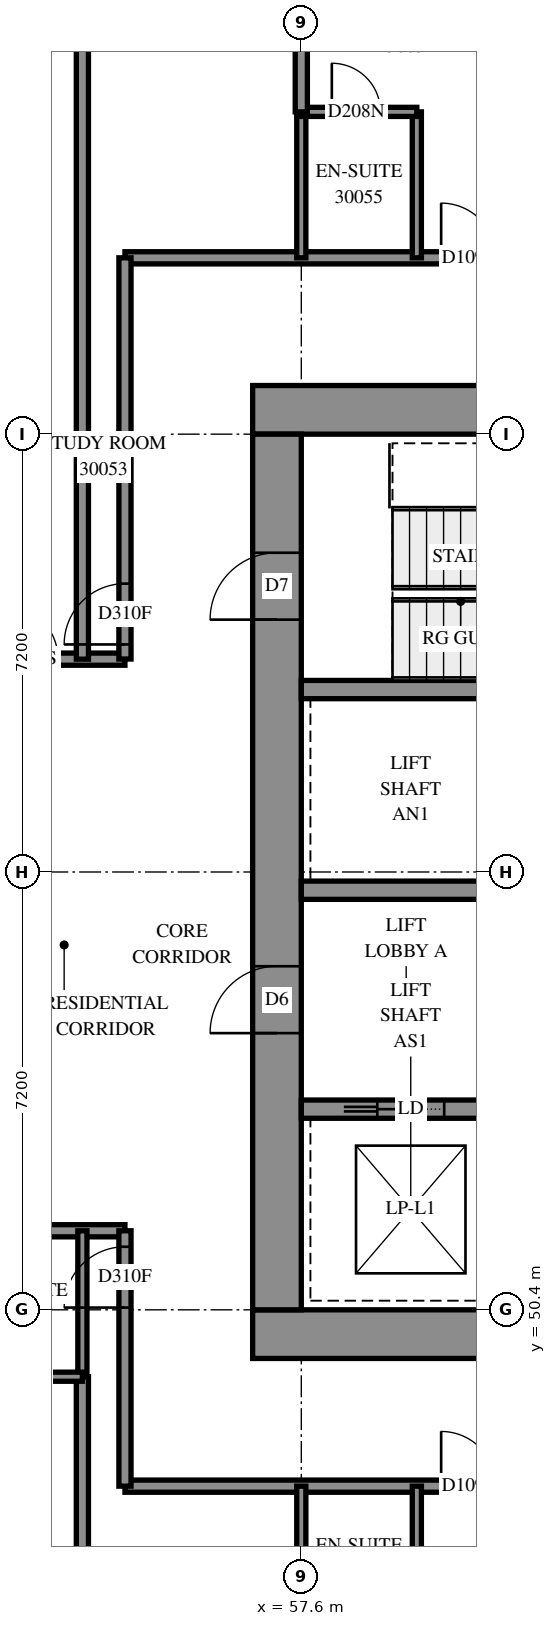
"""IFC4 building model, lengths in metres.
Left out: names, types, materials, properties, quantities, classifications, styles, units other than length and angle.
Written with IfcOpenShell. Run it as: python <this file> out.ifc"""

import sys

from ifc_helpers import new_model, si_unit, direction, frame, frame_2d, origin, place, context, subcontext, project, spatial, rectangle, extrude, element, fill, save


model = new_model("IFC4")
c1 = context("Model", 3, precision=1e-05, world=origin(), true_north=direction((0.0, 1.0)))
c2 = subcontext(c1, "Body", "Model", "MODEL_VIEW")
j1 = project(units=[si_unit("LENGTHUNIT", "METRE"), si_unit("PLANEANGLEUNIT", "RADIAN")], contexts=[c1])
p1 = place(None, origin())
s1 = spatial("IfcSite", under=j1, at=p1, CompositionType="ELEMENT")
p2 = place(p1, origin())
s2 = spatial("IfcBuilding", under=s1, at=p2, CompositionType="ELEMENT")
p3 = place(p2, frame((0.0, 0.0, 111.8)))
s3 = spatial("IfcBuildingStorey", under=s2, at=p3, CompositionType="ELEMENT", Elevation=111.8)
p4 = place(p3, frame((56.8, 50.0, -0.3), z_axis=(0.0, 0.0, 1.0), x_axis=(1.0, 0.0, 0.0)))
e1 = element("IfcWall", 1, at=p4, inside=s3, PredefinedType="SHEAR", context=c2, shape_type="SweptSolid", body=[
    extrude(rectangle(XDim=16.0, YDim=0.8, at=frame_2d((8.0, 0.0))), origin(), (0.0, 0.0, 1.0), 2.7),
])
p5 = place(p3, frame((56.8, 65.2, -0.3), z_axis=(0.0, 0.0, 1.0), x_axis=(1.0, 0.0, 0.0)))
e2 = element("IfcWall", 2, at=p5, inside=s3, PredefinedType="SHEAR", context=c2, shape_type="SweptSolid", body=[
    extrude(rectangle(XDim=16.0, YDim=0.8, at=frame_2d((8.0, 0.0))), origin(), (0.0, 0.0, 1.0), 2.7),
])
p6 = place(p5, frame((10.8, 0.0, 0.3)))
e3 = element("IfcOpeningElement", 3, at=p6, cuts=e2, PredefinedType="OPENING", context=c2, shape_type="SweptSolid", body=[
    extrude(rectangle(XDim=0.8, YDim=2.1, at=frame_2d((0.4, 1.05))), frame((0.0, 0.41, 0.0), z_axis=(0.0, -1.0, 0.0), x_axis=(1.0, 0.0, 0.0)), (0.0, 0.0, 1.0), 0.82),
])
p7 = place(p3, frame((57.2, 50.4, -0.3), z_axis=(0.0, 0.0, 1.0), x_axis=(0.0, 1.0, 0.0)))
e4 = element("IfcWall", 4, at=p7, inside=s3, PredefinedType="SHEAR", context=c2, shape_type="SweptSolid", body=[
    extrude(rectangle(XDim=14.4, YDim=0.8, at=frame_2d((7.2, 0.0))), origin(), (0.0, 0.0, 1.0), 2.7),
])
p8 = place(p7, frame((4.55, 0.0, 0.3)))
e5 = element("IfcOpeningElement", 5, at=p8, cuts=e4, PredefinedType="OPENING", context=c2, shape_type="SweptSolid", body=[
    extrude(rectangle(XDim=1.1, YDim=2.1, at=frame_2d((0.55, 1.05))), frame((0.0, 0.41, 0.0), z_axis=(0.0, -1.0, 0.0), x_axis=(1.0, 0.0, 0.0)), (0.0, 0.0, 1.0), 0.82),
])
p9 = place(p7, frame((11.35, 0.0, 0.3)))
e6 = element("IfcOpeningElement", 6, at=p9, cuts=e4, PredefinedType="OPENING", context=c2, shape_type="SweptSolid", body=[
    extrude(rectangle(XDim=1.1, YDim=2.1, at=frame_2d((0.55, 1.05))), frame((0.0, 0.41, 0.0), z_axis=(0.0, -1.0, 0.0), x_axis=(1.0, 0.0, 0.0)), (0.0, 0.0, 1.0), 0.82),
])
p10 = place(p3, frame((57.6, 53.7, 0.0), z_axis=(0.0, 0.0, 1.0), x_axis=(1.0, 0.0, 0.0)))
e7 = element("IfcWall", 7, at=p10, inside=s3, PredefinedType="SOLIDWALL", context=c2, shape_type="SweptSolid", body=[
    extrude(rectangle(XDim=14.4, YDim=0.3, at=frame_2d((7.2, 0.0))), origin(), (0.0, 0.0, 1.0), 3.1),
])
p11 = place(p10, frame((1.25, 0.0, 0.0)))
e8 = element("IfcOpeningElement", 8, at=p11, cuts=e7, PredefinedType="OPENING", context=c2, shape_type="SweptSolid", body=[
    extrude(rectangle(XDim=1.1, YDim=2.1, at=frame_2d((0.55, 1.05))), frame((0.0, 0.16, 0.0), z_axis=(0.0, -1.0, 0.0), x_axis=(1.0, 0.0, 0.0)), (0.0, 0.0, 1.0), 0.32),
])
p12 = place(p10, frame((4.85, 0.0, 0.0)))
e9 = element("IfcOpeningElement", 9, at=p12, cuts=e7, PredefinedType="OPENING", context=c2, shape_type="SweptSolid", body=[
    extrude(rectangle(XDim=1.1, YDim=2.1, at=frame_2d((0.55, 1.05))), frame((0.0, 0.16, 0.0), z_axis=(0.0, -1.0, 0.0), x_axis=(1.0, 0.0, 0.0)), (0.0, 0.0, 1.0), 0.32),
])
p13 = place(p10, frame((8.45, 0.0, 0.0)))
e10 = element("IfcOpeningElement", 10, at=p13, cuts=e7, PredefinedType="OPENING", context=c2, shape_type="SweptSolid", body=[
    extrude(rectangle(XDim=1.1, YDim=2.1, at=frame_2d((0.55, 1.05))), frame((0.0, 0.16, 0.0), z_axis=(0.0, -1.0, 0.0), x_axis=(1.0, 0.0, 0.0)), (0.0, 0.0, 1.0), 0.32),
])
p14 = place(p10, frame((12.05, 0.0, 0.0)))
e11 = element("IfcOpeningElement", 11, at=p14, cuts=e7, PredefinedType="OPENING", context=c2, shape_type="SweptSolid", body=[
    extrude(rectangle(XDim=1.1, YDim=2.1, at=frame_2d((0.55, 1.05))), frame((0.0, 0.16, 0.0), z_axis=(0.0, -1.0, 0.0), x_axis=(1.0, 0.0, 0.0)), (0.0, 0.0, 1.0), 0.32),
])
p15 = place(p3, frame((57.6, 57.3, 0.0), z_axis=(0.0, 0.0, 1.0), x_axis=(1.0, 0.0, 0.0)))
e12 = element("IfcWall", 12, at=p15, inside=s3, PredefinedType="SOLIDWALL", context=c2, shape_type="SweptSolid", body=[
    extrude(rectangle(XDim=14.4, YDim=0.3, at=frame_2d((7.2, 0.0))), origin(), (0.0, 0.0, 1.0), 3.1),
])
p16 = place(p15, frame((12.05, 0.0, 0.0)))
e13 = element("IfcOpeningElement", 13, at=p16, cuts=e12, PredefinedType="OPENING", context=c2, shape_type="SweptSolid", body=[
    extrude(rectangle(XDim=1.1, YDim=2.1, at=frame_2d((0.55, 1.05))), frame((0.0, 0.16, 0.0), z_axis=(0.0, -1.0, 0.0), x_axis=(1.0, 0.0, 0.0)), (0.0, 0.0, 1.0), 0.32),
])
p17 = place(p3, frame((57.6, 60.6, 0.0), z_axis=(0.0, 0.0, 1.0), x_axis=(1.0, 0.0, 0.0)))
e14 = element("IfcWall", 14, at=p17, inside=s3, PredefinedType="SOLIDWALL", context=c2, shape_type="SweptSolid", body=[
    extrude(rectangle(XDim=7.2, YDim=0.3, at=frame_2d((3.6, 0.0))), origin(), (0.0, 0.0, 1.0), 3.1),
])
p18 = place(p3, frame((33.502, 61.1, 0.0), z_axis=(0.0, 0.0, 1.0), x_axis=(1.0, 0.0, 0.0)))
e15 = element("IfcWall", 15, at=p18, inside=s3, PredefinedType="PARTITIONING", context=c2, shape_type="SweptSolid", body=[
    extrude(rectangle(XDim=21.198, YDim=0.2, at=frame_2d((10.599, 0.0))), origin(), (0.0, 0.0, 1.0), 3.1),
])
p19 = place(p18, frame((4.798, 0.0, 0.0)))
e16 = element("IfcOpeningElement", 16, at=p19, cuts=e15, PredefinedType="OPENING", context=c2, shape_type="SweptSolid", body=[
    extrude(rectangle(XDim=0.9, YDim=2.1, at=frame_2d((0.45, 1.05))), frame((0.0, 0.11, 0.0), z_axis=(0.0, -1.0, 0.0), x_axis=(1.0, 0.0, 0.0)), (0.0, 0.0, 1.0), 0.22),
])
p20 = place(p18, frame((6.498, 0.0, 0.0)))
e17 = element("IfcOpeningElement", 17, at=p20, cuts=e15, PredefinedType="OPENING", context=c2, shape_type="SweptSolid", body=[
    extrude(rectangle(XDim=0.9, YDim=2.1, at=frame_2d((0.45, 1.05))), frame((0.0, 0.11, 0.0), z_axis=(0.0, -1.0, 0.0), x_axis=(1.0, 0.0, 0.0)), (0.0, 0.0, 1.0), 0.22),
])
p21 = place(p18, frame((11.998, 0.0, 0.0)))
e18 = element("IfcOpeningElement", 18, at=p21, cuts=e15, PredefinedType="OPENING", context=c2, shape_type="SweptSolid", body=[
    extrude(rectangle(XDim=0.9, YDim=2.1, at=frame_2d((0.45, 1.05))), frame((0.0, 0.11, 0.0), z_axis=(0.0, -1.0, 0.0), x_axis=(1.0, 0.0, 0.0)), (0.0, 0.0, 1.0), 0.22),
])
p22 = place(p18, frame((13.698, 0.0, 0.0)))
e19 = element("IfcOpeningElement", 19, at=p22, cuts=e15, PredefinedType="OPENING", context=c2, shape_type="SweptSolid", body=[
    extrude(rectangle(XDim=0.9, YDim=2.1, at=frame_2d((0.45, 1.05))), frame((0.0, 0.11, 0.0), z_axis=(0.0, -1.0, 0.0), x_axis=(1.0, 0.0, 0.0)), (0.0, 0.0, 1.0), 0.22),
])
p23 = place(p18, frame((19.198, 0.0, 0.0)))
e20 = element("IfcOpeningElement", 20, at=p23, cuts=e15, PredefinedType="OPENING", context=c2, shape_type="SweptSolid", body=[
    extrude(rectangle(XDim=0.9, YDim=2.1, at=frame_2d((0.45, 1.05))), frame((0.0, 0.11, 0.0), z_axis=(0.0, -1.0, 0.0), x_axis=(1.0, 0.0, 0.0)), (0.0, 0.0, 1.0), 0.22),
])
p24 = place(p3, frame((54.7, 67.7, 0.0), z_axis=(0.0, 0.0, 1.0), x_axis=(1.0, 0.0, 0.0)))
e21 = element("IfcWall", 21, at=p24, inside=s3, PredefinedType="PARTITIONING", context=c2, shape_type="SweptSolid", body=[
    extrude(rectangle(XDim=20.2, YDim=0.2, at=frame_2d((10.1, 0.0))), origin(), (0.0, 0.0, 1.0), 3.1),
])
p25 = place(p24, frame((5.2, 0.0, 0.0)))
e22 = element("IfcOpeningElement", 22, at=p25, cuts=e21, PredefinedType="OPENING", context=c2, shape_type="SweptSolid", body=[
    extrude(rectangle(XDim=0.9, YDim=2.1, at=frame_2d((0.45, 1.05))), frame((0.0, 0.11, 0.0), z_axis=(0.0, -1.0, 0.0), x_axis=(1.0, 0.0, 0.0)), (0.0, 0.0, 1.0), 0.22),
])
p26 = place(p24, frame((8.838, 0.0, 0.0)))
e23 = element("IfcOpeningElement", 23, at=p26, cuts=e21, PredefinedType="OPENING", context=c2, shape_type="SweptSolid", body=[
    extrude(rectangle(XDim=1.0, YDim=2.1, at=frame_2d((0.5, 1.05))), frame((0.0, 0.11, 0.0), z_axis=(0.0, -1.0, 0.0), x_axis=(1.0, 0.0, 0.0)), (0.0, 0.0, 1.0), 0.22),
])
p27 = place(p24, frame((14.1, 0.0, 0.0)))
e24 = element("IfcOpeningElement", 24, at=p27, cuts=e21, PredefinedType="OPENING", context=c2, shape_type="SweptSolid", body=[
    extrude(rectangle(XDim=0.9, YDim=2.1, at=frame_2d((0.45, 1.05))), frame((0.0, 0.11, 0.0), z_axis=(0.0, -1.0, 0.0), x_axis=(1.0, 0.0, 0.0)), (0.0, 0.0, 1.0), 0.22),
])
p28 = place(p3, frame((54.7, 47.5, 0.0), z_axis=(0.0, 0.0, 1.0), x_axis=(1.0, 0.0, 0.0)))
e25 = element("IfcWall", 25, at=p28, inside=s3, PredefinedType="PARTITIONING", context=c2, shape_type="SweptSolid", body=[
    extrude(rectangle(XDim=19.442, YDim=0.2, at=frame_2d((9.721, 0.0))), origin(), (0.0, 0.0, 1.0), 3.1),
])
p29 = place(p28, frame((5.2, 0.0, 0.0)))
e26 = element("IfcOpeningElement", 26, at=p29, cuts=e25, PredefinedType="OPENING", context=c2, shape_type="SweptSolid", body=[
    extrude(rectangle(XDim=0.9, YDim=2.1, at=frame_2d((0.45, 1.05))), frame((0.0, 0.11, 0.0), z_axis=(0.0, -1.0, 0.0), x_axis=(1.0, 0.0, 0.0)), (0.0, 0.0, 1.0), 0.22),
])
p30 = place(p28, frame((8.757, 0.0, 0.0)))
e27 = element("IfcOpeningElement", 27, at=p30, cuts=e25, PredefinedType="OPENING", context=c2, shape_type="SweptSolid", body=[
    extrude(rectangle(XDim=0.9, YDim=2.1, at=frame_2d((0.45, 1.05))), frame((0.0, 0.11, 0.0), z_axis=(0.0, -1.0, 0.0), x_axis=(1.0, 0.0, 0.0)), (0.0, 0.0, 1.0), 0.22),
])
p31 = place(p28, frame((14.05, 0.0, 0.0)))
e28 = element("IfcOpeningElement", 28, at=p31, cuts=e25, PredefinedType="OPENING", context=c2, shape_type="SweptSolid", body=[
    extrude(rectangle(XDim=0.9, YDim=2.1, at=frame_2d((0.45, 1.05))), frame((0.0, 0.11, 0.0), z_axis=(0.0, -1.0, 0.0), x_axis=(1.0, 0.0, 0.0)), (0.0, 0.0, 1.0), 0.22),
])
p32 = place(p3, frame((54.0, 61.1, 0.0), z_axis=(0.0, 0.0, 1.0), x_axis=(0.0, 1.0, 0.0)))
e29 = element("IfcWall", 29, at=p32, inside=s3, PredefinedType="PARTITIONING", context=c2, shape_type="SweptSolid", body=[
    extrude(rectangle(XDim=11.617, YDim=0.2, at=frame_2d((5.808, 0.0))), origin(), (0.0, 0.0, 1.0), 3.1),
])
p33 = place(p3, frame((54.0, 42.324, 0.0), z_axis=(0.0, 0.0, 1.0), x_axis=(0.0, 1.0, 0.0)))
e30 = element("IfcWall", 30, at=p33, inside=s3, PredefinedType="PARTITIONING", context=c2, shape_type="SweptSolid", body=[
    extrude(rectangle(XDim=6.976, YDim=0.2, at=frame_2d((3.488, 0.0))), origin(), (0.0, 0.0, 1.0), 3.1),
])
p34 = place(p3, frame((54.7, 61.102, 0.0), z_axis=(0.0, 0.0, 1.0), x_axis=(0.0, 1.0, 0.0)))
e31 = element("IfcWall", 31, at=p34, inside=s3, PredefinedType="PARTITIONING", context=c2, shape_type="SweptSolid", body=[
    extrude(rectangle(XDim=6.598, YDim=0.2, at=frame_2d((3.299, 0.0))), origin(), (0.0, 0.0, 1.0), 3.1),
])
p35 = place(p34, frame((0.24, 0.0, 0.0)))
e32 = element("IfcOpeningElement", 32, at=p35, cuts=e31, PredefinedType="OPENING", context=c2, shape_type="SweptSolid", body=[
    extrude(rectangle(XDim=1.0, YDim=2.1, at=frame_2d((0.5, 1.05))), frame((0.0, 0.11, 0.0), z_axis=(0.0, -1.0, 0.0), x_axis=(1.0, 0.0, 0.0)), (0.0, 0.0, 1.0), 0.22),
])
p36 = place(p3, frame((50.4, 51.7, 0.0), z_axis=(0.0, 0.0, 1.0), x_axis=(1.0, 0.0, 0.0)))
e33 = element("IfcWall", 33, at=p36, inside=s3, PredefinedType="PARTITIONING", context=c2, shape_type="SweptSolid", body=[
    extrude(rectangle(XDim=4.3, YDim=0.2, at=frame_2d((2.15, 0.0))), origin(), (0.0, 0.0, 1.0), 3.1),
])
p37 = place(p36, frame((0.552, 0.0, 0.0)))
e34 = element("IfcOpeningElement", 34, at=p37, cuts=e33, PredefinedType="OPENING", context=c2, shape_type="SweptSolid", body=[
    extrude(rectangle(XDim=0.9, YDim=2.1, at=frame_2d((0.45, 1.05))), frame((0.0, 0.11, 0.0), z_axis=(0.0, -1.0, 0.0), x_axis=(1.0, 0.0, 0.0)), (0.0, 0.0, 1.0), 0.22),
])
p38 = place(p3, frame((54.7, 47.5, 0.0), z_axis=(0.0, 0.0, 1.0), x_axis=(0.0, 1.0, 0.0)))
e35 = element("IfcWall", 35, at=p38, inside=s3, PredefinedType="PARTITIONING", context=c2, shape_type="SweptSolid", body=[
    extrude(rectangle(XDim=4.2, YDim=0.2, at=frame_2d((2.1, 0.0))), origin(), (0.0, 0.0, 1.0), 3.1),
])
p39 = place(p38, frame((2.937, 0.0, 0.0)))
e36 = element("IfcOpeningElement", 36, at=p39, cuts=e35, PredefinedType="OPENING", context=c2, shape_type="SweptSolid", body=[
    extrude(rectangle(XDim=1.0, YDim=2.1, at=frame_2d((0.5, 1.05))), frame((0.0, 0.11, 0.0), z_axis=(0.0, -1.0, 0.0), x_axis=(1.0, 0.0, 0.0)), (0.0, 0.0, 1.0), 0.22),
])
for number, where, z_axis, x_axis in (
    (37, (54.0, 49.3, 0.0), (0.0, 0.0, 1.0), (0.0, 1.0, 0.0)),
    (38, (59.5, 45.1, 0.0), (0.0, 0.0, 1.0), (0.0, 1.0, 0.0)),
    (39, (57.6, 45.1, 0.0), (0.0, 0.0, 1.0), (0.0, 1.0, 0.0)),
    (40, (59.5, 67.7, 0.0), (0.0, 0.0, 1.0), (0.0, 1.0, 0.0)),
    (41, (57.6, 67.7, 0.0), (0.0, 0.0, 1.0), (0.0, 1.0, 0.0)),
):
    element("IfcWall", number, at=place(p3, frame(where, z_axis=z_axis, x_axis=x_axis)), inside=s3, PredefinedType="PARTITIONING", context=c2, shape_type="SweptSolid", body=[
        extrude(rectangle(XDim=2.4, YDim=0.15, at=frame_2d((1.2, 0.0))), origin(), (0.0, 0.0, 1.0), 3.1),
    ])
p40 = place(p3, frame((52.1, 49.3, 0.0), z_axis=(0.0, 0.0, 1.0), x_axis=(1.0, 0.0, 0.0)))
e42 = element("IfcWall", 42, at=p40, inside=s3, PredefinedType="PARTITIONING", context=c2, shape_type="SweptSolid", body=[
    extrude(rectangle(XDim=1.9, YDim=0.15, at=frame_2d((0.95, 0.0))), origin(), (0.0, 0.0, 1.0), 3.1),
])
p41 = place(p40, frame((0.493, 0.0, 0.0)))
e43 = element("IfcOpeningElement", 43, at=p41, cuts=e42, PredefinedType="OPENING", context=c2, shape_type="SweptSolid", body=[
    extrude(rectangle(XDim=0.8, YDim=2.1, at=frame_2d((0.4, 1.05))), frame((0.0, 0.085, 0.0), z_axis=(0.0, -1.0, 0.0), x_axis=(1.0, 0.0, 0.0)), (0.0, 0.0, 1.0), 0.17),
])
p42 = place(p3, frame((57.6, 70.1, 0.0), z_axis=(0.0, 0.0, 1.0), x_axis=(1.0, 0.0, 0.0)))
e44 = element("IfcWall", 44, at=p42, inside=s3, PredefinedType="PARTITIONING", context=c2, shape_type="SweptSolid", body=[
    extrude(rectangle(XDim=1.9, YDim=0.15, at=frame_2d((0.95, 0.0))), origin(), (0.0, 0.0, 1.0), 3.1),
])
p43 = place(p42, frame((0.502, 0.0, 0.0)))
e45 = element("IfcOpeningElement", 45, at=p43, cuts=e44, PredefinedType="OPENING", context=c2, shape_type="SweptSolid", body=[
    extrude(rectangle(XDim=0.8, YDim=2.1, at=frame_2d((0.4, 1.05))), frame((0.0, 0.085, 0.0), z_axis=(0.0, -1.0, 0.0), x_axis=(1.0, 0.0, 0.0)), (0.0, 0.0, 1.0), 0.17),
])
p44 = place(p3, frame((57.6, 70.1, 0.0), z_axis=(0.0, 0.0, 1.0), x_axis=(0.0, 1.0, 0.0)))
e46 = element("IfcWall", 46, at=p44, inside=s3, PredefinedType="PARTITIONING", context=c2, shape_type="SweptSolid", body=[
    extrude(rectangle(XDim=1.4, YDim=0.2, at=frame_2d((0.7, 0.0))), origin(), (0.0, 0.0, 1.0), 3.1),
])
p45 = place(p8, origin())
e47 = element("IfcDoor", 47, at=p45, inside=s3, OperationType="DOUBLE_DOOR_SINGLE_SWING", PredefinedType="DOOR", context=c2, shape_type="SweptSolid", body=[
    extrude(rectangle(XDim=1.1, YDim=2.1, at=frame_2d((0.55, 1.05))), frame((0.0, 0.025, 0.0), z_axis=(0.0, -1.0, 0.0), x_axis=(1.0, 0.0, 0.0)), (0.0, 0.0, 1.0), 0.05),
])
fill(e5, e47)
p46 = place(p9, origin())
e48 = element("IfcDoor", 48, at=p46, inside=s3, OperationType="SINGLE_SWING_LEFT", PredefinedType="DOOR", context=c2, shape_type="SweptSolid", body=[
    extrude(rectangle(XDim=1.1, YDim=2.1, at=frame_2d((0.55, 1.05))), frame((0.0, 0.025, 0.0), z_axis=(0.0, -1.0, 0.0), x_axis=(1.0, 0.0, 0.0)), (0.0, 0.0, 1.0), 0.05),
])
fill(e6, e48)
p47 = place(p11, origin())
e49 = element("IfcDoor", 49, at=p47, inside=s3, OperationType="SLIDING_TO_LEFT", PredefinedType="DOOR", context=c2, shape_type="SweptSolid", body=[
    extrude(rectangle(XDim=1.1, YDim=2.1, at=frame_2d((0.55, 1.05))), frame((0.0, 0.025, 0.0), z_axis=(0.0, -1.0, 0.0), x_axis=(1.0, 0.0, 0.0)), (0.0, 0.0, 1.0), 0.05),
])
fill(e8, e49)
p48 = place(p39, origin())
e50 = element("IfcDoor", 50, at=p48, inside=s3, OperationType="SINGLE_SWING_RIGHT", PredefinedType="DOOR", context=c2, shape_type="SweptSolid", body=[
    extrude(rectangle(XDim=1.0, YDim=2.1, at=frame_2d((0.5, 1.05))), frame((0.0, 0.025, 0.0), z_axis=(0.0, -1.0, 0.0), x_axis=(1.0, 0.0, 0.0)), (0.0, 0.0, 1.0), 0.05),
])
fill(e36, e50)
p49 = place(p29, origin())
e51 = element("IfcDoor", 51, at=p49, inside=s3, OperationType="SINGLE_SWING_LEFT", PredefinedType="DOOR", context=c2, shape_type="SweptSolid", body=[
    extrude(rectangle(XDim=0.9, YDim=2.1, at=frame_2d((0.45, 1.05))), frame((0.0, 0.025, 0.0), z_axis=(0.0, -1.0, 0.0), x_axis=(1.0, 0.0, 0.0)), (0.0, 0.0, 1.0), 0.05),
])
fill(e26, e51)
p50 = place(p23, origin())
e52 = element("IfcDoor", 52, at=p50, inside=s3, OperationType="SINGLE_SWING_RIGHT", PredefinedType="DOOR", context=c2, shape_type="SweptSolid", body=[
    extrude(rectangle(XDim=0.9, YDim=2.1, at=frame_2d((0.45, 1.05))), frame((0.0, 0.025, 0.0), z_axis=(0.0, -1.0, 0.0), x_axis=(1.0, 0.0, 0.0)), (0.0, 0.0, 1.0), 0.05),
])
fill(e20, e52)
p51 = place(p35, origin())
e53 = element("IfcDoor", 53, at=p51, inside=s3, OperationType="SINGLE_SWING_LEFT", PredefinedType="DOOR", context=c2, shape_type="SweptSolid", body=[
    extrude(rectangle(XDim=1.0, YDim=2.1, at=frame_2d((0.5, 1.05))), frame((0.0, 0.025, 0.0), z_axis=(0.0, -1.0, 0.0), x_axis=(1.0, 0.0, 0.0)), (0.0, 0.0, 1.0), 0.05),
])
fill(e32, e53)
p52 = place(p25, origin())
e54 = element("IfcDoor", 54, at=p52, inside=s3, OperationType="SINGLE_SWING_RIGHT", PredefinedType="DOOR", context=c2, shape_type="SweptSolid", body=[
    extrude(rectangle(XDim=0.9, YDim=2.1, at=frame_2d((0.45, 1.05))), frame((0.0, 0.025, 0.0), z_axis=(0.0, -1.0, 0.0), x_axis=(1.0, 0.0, 0.0)), (0.0, 0.0, 1.0), 0.05),
])
fill(e22, e54)
p53 = place(p43, origin())
e55 = element("IfcDoor", 55, at=p53, inside=s3, OperationType="SINGLE_SWING_RIGHT", PredefinedType="DOOR", context=c2, shape_type="SweptSolid", body=[
    extrude(rectangle(XDim=0.8, YDim=2.1, at=frame_2d((0.4, 1.05))), frame((0.0, 0.025, 0.0), z_axis=(0.0, -1.0, 0.0), x_axis=(1.0, 0.0, 0.0)), (0.0, 0.0, 1.0), 0.05),
])
fill(e45, e55)
save(model, sys.argv[1])
